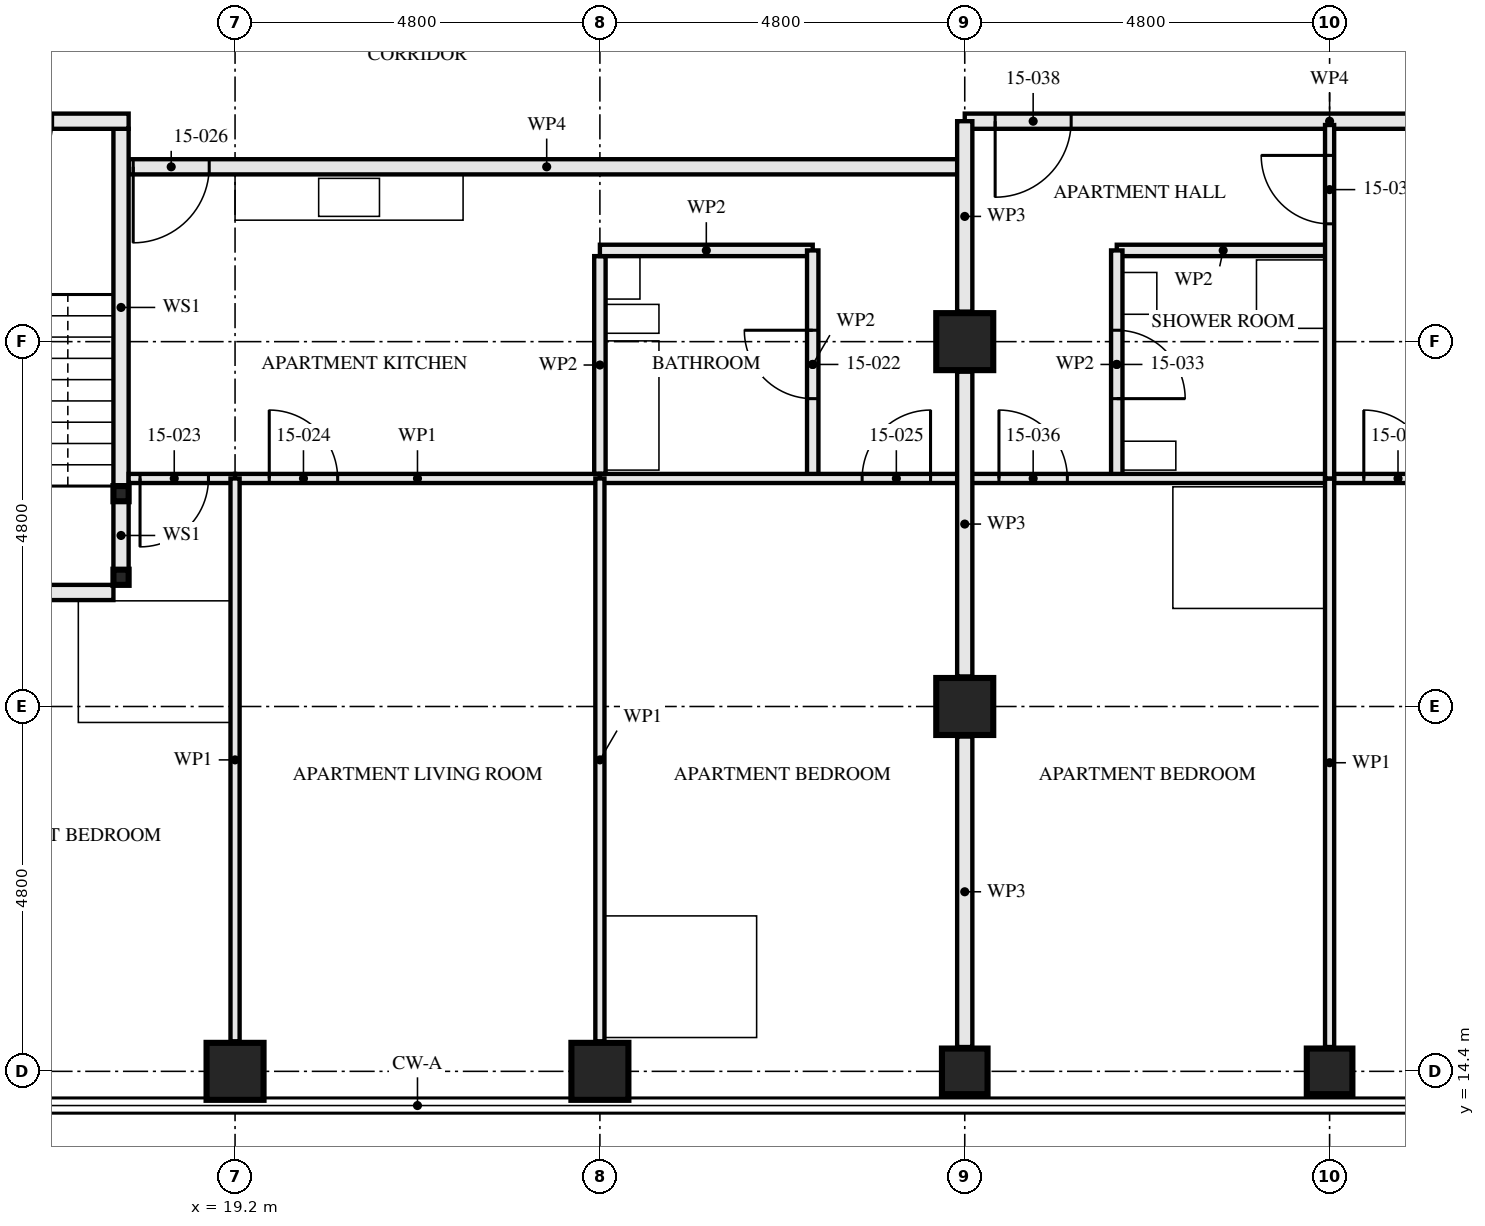
"""IFC4 building model, lengths in metres.
Left out: names, types, materials, properties, quantities, classifications, styles, units other than length and angle.
Written with IfcOpenShell. Run it as: python <this file> out.ifc"""

import sys

from ifc_helpers import new_model, si_unit, direction, frame, frame_2d, origin, origin_2d, place, context, subcontext, project, spatial, rectangle, hollow_rectangle, extrude, element, fill, save


model = new_model("IFC4")
c1 = context("Model", 3, precision=1e-05, world=origin(), true_north=direction((0.0, 1.0)))
c2 = subcontext(c1, "Body", "Model", "MODEL_VIEW")
j1 = project(units=[si_unit("LENGTHUNIT", "METRE"), si_unit("PLANEANGLEUNIT", "RADIAN")], contexts=[c1])
p1 = place(None, origin())
s1 = spatial("IfcSite", under=j1, at=p1, CompositionType="ELEMENT")
p2 = place(p1, origin())
s2 = spatial("IfcBuilding", under=s1, at=p2, CompositionType="ELEMENT")
p3 = place(p2, frame((0.0, 0.0, 58.5)))
s3 = spatial("IfcBuildingStorey", under=s2, at=p3, CompositionType="ELEMENT", Elevation=58.5)
for number, where, z_axis, x_axis in (
    (1, (19.2, 14.4, 0.0), (0.0, 0.0, 1.0), (0.0, 1.0, 0.0)),
    (2, (24.0, 14.4, 0.0), (0.0, 0.0, 1.0), (0.0, 1.0, 0.0)),
):
    element("IfcColumn", number, at=place(p3, frame(where, z_axis=z_axis, x_axis=x_axis)), inside=s3, PredefinedType="COLUMN", context=c2, shape_type="SweptSolid", body=[
        extrude(hollow_rectangle(XDim=0.75, YDim=0.75, WallThickness=0.08, at=origin_2d()), origin(), (0.0, 0.0, 1.0), 3.5),
    ])
p4 = place(p3, frame((28.8, 14.4, 0.0), z_axis=(0.0, 0.0, 1.0), x_axis=(0.0, 1.0, 0.0)))
e3 = element("IfcColumn", 3, at=p4, inside=s3, PredefinedType="COLUMN", context=c2, shape_type="SweptSolid", body=[
    extrude(hollow_rectangle(XDim=0.6, YDim=0.6, WallThickness=0.08, at=origin_2d()), origin(), (0.0, 0.0, 1.0), 3.5),
])
for number, where, z_axis, x_axis in (
    (4, (28.8, 19.2, 0.0), (0.0, 0.0, 1.0), (1.0, 0.0, 0.0)),
    (5, (28.8, 24.0, 0.0), (0.0, 0.0, 1.0), (1.0, 0.0, 0.0)),
):
    element("IfcColumn", number, at=place(p3, frame(where, z_axis=z_axis, x_axis=x_axis)), inside=s3, PredefinedType="COLUMN", context=c2, shape_type="SweptSolid", body=[
        extrude(hollow_rectangle(XDim=0.75, YDim=0.75, WallThickness=0.08, at=origin_2d()), origin(), (0.0, 0.0, 1.0), 3.5),
    ])
p5 = place(p3, frame((33.6, 14.4, 0.0), z_axis=(0.0, 0.0, 1.0), x_axis=(0.0, 1.0, 0.0)))
e6 = element("IfcColumn", 6, at=p5, inside=s3, PredefinedType="COLUMN", context=c2, shape_type="SweptSolid", body=[
    extrude(hollow_rectangle(XDim=0.6, YDim=0.6, WallThickness=0.08, at=origin_2d()), origin(), (0.0, 0.0, 1.0), 3.5),
])
for number, where, z_axis, x_axis in (
    (7, (17.7, 20.9, 0.0), (0.0, 0.0, 1.0), (1.0, 0.0, 0.0)),
    (8, (17.7, 22.0, 0.0), (0.0, 0.0, 1.0), (1.0, 0.0, 0.0)),
):
    element("IfcColumn", number, at=place(p3, frame(where, z_axis=z_axis, x_axis=x_axis)), inside=s3, PredefinedType="COLUMN", context=c2, shape_type="SweptSolid", body=[
        extrude(hollow_rectangle(XDim=0.2, YDim=0.2, WallThickness=0.008, at=origin_2d()), origin(), (0.0, 0.0, 1.0), 3.33),
    ])
p6 = place(p3, frame((17.7, 21.0, 0.0), z_axis=(0.0, 0.0, 1.0), x_axis=(0.0, 1.0, 0.0)))
e9 = element("IfcWall", 9, at=p6, inside=s3, PredefinedType="SOLIDWALL", context=c2, shape_type="SweptSolid", body=[
    extrude(rectangle(XDim=0.9, YDim=0.2, at=frame_2d((0.45, 0.0))), origin(), (0.0, 0.0, 1.0), 2.99),
])
p7 = place(p3, frame((17.7, 22.1, 0.0), z_axis=(0.0, 0.0, 1.0), x_axis=(0.0, 1.0, 0.0)))
e10 = element("IfcWall", 10, at=p7, inside=s3, PredefinedType="SOLIDWALL", context=c2, shape_type="SweptSolid", body=[
    extrude(rectangle(XDim=4.7, YDim=0.2, at=frame_2d((2.35, 0.0))), origin(), (0.0, 0.0, 1.0), 2.99),
])
p8 = place(p3, frame((15.0, 20.7, 0.0), z_axis=(0.0, 0.0, 1.0), x_axis=(1.0, 0.0, 0.0)))
e11 = element("IfcWall", 11, at=p8, inside=s3, PredefinedType="SOLIDWALL", context=c2, shape_type="SweptSolid", body=[
    extrude(rectangle(XDim=2.6, YDim=0.2, at=frame_2d((1.3, 0.0))), origin(), (0.0, 0.0, 1.0), 3.33),
])
p9 = place(p3, frame((14.4, 26.9, 0.0), z_axis=(0.0, 0.0, 1.0), x_axis=(1.0, 0.0, 0.0)))
e12 = element("IfcWall", 12, at=p9, inside=s3, PredefinedType="SOLIDWALL", context=c2, shape_type="SweptSolid", body=[
    extrude(rectangle(XDim=3.4, YDim=0.2, at=frame_2d((1.7, 0.0))), origin(), (0.0, 0.0, 1.0), 3.33),
])
p10 = place(p9, frame((1.4, 0.0, 0.0)))
e13 = element("IfcOpeningElement", 13, at=p10, cuts=e12, PredefinedType="OPENING", context=c2, shape_type="SweptSolid", body=[
    extrude(rectangle(XDim=1.0, YDim=2.1, at=frame_2d((0.5, 1.05))), frame((0.0, 0.111, 0.0), z_axis=(0.0, -1.0, 0.0), x_axis=(1.0, 0.0, 0.0)), (0.0, 0.0, 1.0), 0.221),
])
p11 = place(p3, frame((26.8, 22.2, 0.0), z_axis=(0.0, 0.0, 1.0), x_axis=(0.0, 1.0, 0.0)))
e14 = element("IfcWall", 14, at=p11, inside=s3, PredefinedType="PARTITIONING", context=c2, shape_type="SweptSolid", body=[
    extrude(rectangle(XDim=3.0, YDim=0.15, at=frame_2d((1.5, 0.0))), origin(), (0.0, 0.0, 1.0), 2.55),
])
p12 = place(p11, frame((1.05, 0.0, 0.0)))
e15 = element("IfcOpeningElement", 15, at=p12, cuts=e14, PredefinedType="OPENING", context=c2, shape_type="SweptSolid", body=[
    extrude(rectangle(XDim=0.9, YDim=2.1, at=frame_2d((0.45, 1.05))), frame((0.0, 0.085, 0.0), z_axis=(0.0, -1.0, 0.0), x_axis=(1.0, 0.0, 0.0)), (0.0, 0.0, 1.0), 0.171),
])
p13 = place(p3, frame((24.0, 25.2, 0.0), z_axis=(0.0, 0.0, 1.0), x_axis=(1.0, 0.0, 0.0)))
e16 = element("IfcWall", 16, at=p13, inside=s3, PredefinedType="PARTITIONING", context=c2, shape_type="SweptSolid", body=[
    extrude(rectangle(XDim=2.8, YDim=0.15, at=frame_2d((1.4, 0.0))), origin(), (0.0, 0.0, 1.0), 3.33),
])
p14 = place(p3, frame((17.8, 22.2, 0.0), z_axis=(0.0, 0.0, 1.0), x_axis=(1.0, 0.0, 0.0)))
e17 = element("IfcWall", 17, at=p14, inside=s3, PredefinedType="PARTITIONING", context=c2, shape_type="SweptSolid", body=[
    extrude(rectangle(XDim=1.4, YDim=0.12, at=frame_2d((0.7, 0.0))), origin(), (0.0, 0.0, 1.0), 3.33),
])
p15 = place(p14, frame((0.15, 0.0, 0.0)))
e18 = element("IfcOpeningElement", 18, at=p15, cuts=e17, PredefinedType="OPENING", context=c2, shape_type="SweptSolid", body=[
    extrude(rectangle(XDim=0.9, YDim=2.1, at=frame_2d((0.45, 1.05))), frame((0.0, 0.071, 0.0), z_axis=(0.0, -1.0, 0.0), x_axis=(1.0, 0.0, 0.0)), (0.0, 0.0, 1.0), 0.141),
])
p16 = place(p3, frame((19.2, 22.2, 0.0), z_axis=(0.0, 0.0, 1.0), x_axis=(1.0, 0.0, 0.0)))
e19 = element("IfcWall", 19, at=p16, inside=s3, PredefinedType="PARTITIONING", context=c2, shape_type="SweptSolid", body=[
    extrude(rectangle(XDim=4.8, YDim=0.12, at=frame_2d((2.4, 0.0))), origin(), (0.0, 0.0, 1.0), 3.33),
])
p17 = place(p16, frame((0.45, 0.0, 0.0)))
e20 = element("IfcOpeningElement", 20, at=p17, cuts=e19, PredefinedType="OPENING", context=c2, shape_type="SweptSolid", body=[
    extrude(rectangle(XDim=0.9, YDim=2.1, at=frame_2d((0.45, 1.05))), frame((0.0, 0.071, 0.0), z_axis=(0.0, -1.0, 0.0), x_axis=(1.0, 0.0, 0.0)), (0.0, 0.0, 1.0), 0.141),
])
p18 = place(p3, frame((24.0, 22.2, 0.0), z_axis=(0.0, 0.0, 1.0), x_axis=(1.0, 0.0, 0.0)))
e21 = element("IfcWall", 21, at=p18, inside=s3, PredefinedType="PARTITIONING", context=c2, shape_type="SweptSolid", body=[
    extrude(rectangle(XDim=4.8, YDim=0.12, at=frame_2d((2.4, 0.0))), origin(), (0.0, 0.0, 1.0), 3.33),
])
p19 = place(p18, frame((3.45, 0.0, 0.0)))
e22 = element("IfcOpeningElement", 22, at=p19, cuts=e21, PredefinedType="OPENING", context=c2, shape_type="SweptSolid", body=[
    extrude(rectangle(XDim=0.9, YDim=2.1, at=frame_2d((0.45, 1.05))), frame((0.0, 0.071, 0.0), z_axis=(0.0, -1.0, 0.0), x_axis=(1.0, 0.0, 0.0)), (0.0, 0.0, 1.0), 0.141),
])
for number, where, z_axis, x_axis in (
    (23, (19.2, 14.795, 0.0), (0.0, 0.0, 1.0), (0.0, 1.0, 0.0)),
    (24, (24.0, 14.795, 0.0), (0.0, 0.0, 1.0), (0.0, 1.0, 0.0)),
):
    element("IfcWall", number, at=place(p3, frame(where, z_axis=z_axis, x_axis=x_axis)), inside=s3, PredefinedType="PARTITIONING", context=c2, shape_type="SweptSolid", body=[
        extrude(rectangle(XDim=7.405, YDim=0.12, at=frame_2d((3.703, 0.0))), origin(), (0.0, 0.0, 1.0), 2.55),
    ])
p20 = place(p3, frame((17.8, 26.3, 0.0), z_axis=(0.0, 0.0, 1.0), x_axis=(1.0, 0.0, 0.0)))
e25 = element("IfcWall", 25, at=p20, inside=s3, PredefinedType="PARTITIONING", context=c2, shape_type="SweptSolid", body=[
    extrude(rectangle(XDim=11.0, YDim=0.2, at=frame_2d((5.5, 0.0))), origin(), (0.0, 0.0, 1.0), 2.55),
])
p21 = place(p20, frame((0.06, 0.0, 0.0)))
e26 = element("IfcOpeningElement", 26, at=p21, cuts=e25, PredefinedType="OPENING", context=c2, shape_type="SweptSolid", body=[
    extrude(rectangle(XDim=1.0, YDim=2.1, at=frame_2d((0.5, 1.05))), frame((0.0, 0.111, 0.0), z_axis=(0.0, -1.0, 0.0), x_axis=(1.0, 0.0, 0.0)), (0.0, 0.0, 1.0), 0.221),
])
p22 = place(p3, frame((30.8, 22.2, 0.0), z_axis=(0.0, 0.0, 1.0), x_axis=(0.0, 1.0, 0.0)))
e27 = element("IfcWall", 27, at=p22, inside=s3, PredefinedType="PARTITIONING", context=c2, shape_type="SweptSolid", body=[
    extrude(rectangle(XDim=3.0, YDim=0.15, at=frame_2d((1.5, 0.0))), origin(), (0.0, 0.0, 1.0), 2.55),
])
p23 = place(p22, frame((1.05, 0.0, 0.0)))
e28 = element("IfcOpeningElement", 28, at=p23, cuts=e27, PredefinedType="OPENING", context=c2, shape_type="SweptSolid", body=[
    extrude(rectangle(XDim=0.9, YDim=2.1, at=frame_2d((0.45, 1.05))), frame((0.0, 0.085, 0.0), z_axis=(0.0, -1.0, 0.0), x_axis=(1.0, 0.0, 0.0)), (0.0, 0.0, 1.0), 0.171),
])
p24 = place(p3, frame((30.8, 25.2, 0.0), z_axis=(0.0, 0.0, 1.0), x_axis=(1.0, 0.0, 0.0)))
e29 = element("IfcWall", 29, at=p24, inside=s3, PredefinedType="PARTITIONING", context=c2, shape_type="SweptSolid", body=[
    extrude(rectangle(XDim=2.8, YDim=0.15, at=frame_2d((1.4, 0.0))), origin(), (0.0, 0.0, 1.0), 3.33),
])
p25 = place(p3, frame((33.6, 22.2, 0.0), z_axis=(0.0, 0.0, 1.0), x_axis=(0.0, 1.0, 0.0)))
e30 = element("IfcWall", 30, at=p25, inside=s3, PredefinedType="PARTITIONING", context=c2, shape_type="SweptSolid", body=[
    extrude(rectangle(XDim=4.65, YDim=0.12, at=frame_2d((2.325, 0.0))), origin(), (0.0, 0.0, 1.0), 2.55),
])
p26 = place(p25, frame((3.35, 0.0, 0.0)))
e31 = element("IfcOpeningElement", 31, at=p26, cuts=e30, PredefinedType="OPENING", context=c2, shape_type="SweptSolid", body=[
    extrude(rectangle(XDim=0.9, YDim=2.1, at=frame_2d((0.45, 1.05))), frame((0.0, 0.071, 0.0), z_axis=(0.0, -1.0, 0.0), x_axis=(1.0, 0.0, 0.0)), (0.0, 0.0, 1.0), 0.141),
])
p27 = place(p3, frame((28.8, 22.2, 0.0), z_axis=(0.0, 0.0, 1.0), x_axis=(1.0, 0.0, 0.0)))
e32 = element("IfcWall", 32, at=p27, inside=s3, PredefinedType="PARTITIONING", context=c2, shape_type="SweptSolid", body=[
    extrude(rectangle(XDim=4.8, YDim=0.12, at=frame_2d((2.4, 0.0))), origin(), (0.0, 0.0, 1.0), 3.33),
])
p28 = place(p27, frame((0.45, 0.0, 0.0)))
e33 = element("IfcOpeningElement", 33, at=p28, cuts=e32, PredefinedType="OPENING", context=c2, shape_type="SweptSolid", body=[
    extrude(rectangle(XDim=0.9, YDim=2.1, at=frame_2d((0.45, 1.05))), frame((0.0, 0.071, 0.0), z_axis=(0.0, -1.0, 0.0), x_axis=(1.0, 0.0, 0.0)), (0.0, 0.0, 1.0), 0.141),
])
p29 = place(p3, frame((33.6, 22.2, 0.0), z_axis=(0.0, 0.0, 1.0), x_axis=(1.0, 0.0, 0.0)))
e34 = element("IfcWall", 34, at=p29, inside=s3, PredefinedType="PARTITIONING", context=c2, shape_type="SweptSolid", body=[
    extrude(rectangle(XDim=4.8, YDim=0.12, at=frame_2d((2.4, 0.0))), origin(), (0.0, 0.0, 1.0), 3.33),
])
p30 = place(p29, frame((0.45, 0.0, 0.0)))
e35 = element("IfcOpeningElement", 35, at=p30, cuts=e34, PredefinedType="OPENING", context=c2, shape_type="SweptSolid", body=[
    extrude(rectangle(XDim=0.9, YDim=2.1, at=frame_2d((0.45, 1.05))), frame((0.0, 0.071, 0.0), z_axis=(0.0, -1.0, 0.0), x_axis=(1.0, 0.0, 0.0)), (0.0, 0.0, 1.0), 0.141),
])
p31 = place(p3, frame((33.6, 14.72, 0.0), z_axis=(0.0, 0.0, 1.0), x_axis=(0.0, 1.0, 0.0)))
e36 = element("IfcWall", 36, at=p31, inside=s3, PredefinedType="PARTITIONING", context=c2, shape_type="SweptSolid", body=[
    extrude(rectangle(XDim=7.48, YDim=0.12, at=frame_2d((3.74, 0.0))), origin(), (0.0, 0.0, 1.0), 2.55),
])
p32 = place(p3, frame((28.8, 26.9, 0.0), z_axis=(0.0, 0.0, 1.0), x_axis=(1.0, 0.0, 0.0)))
e37 = element("IfcWall", 37, at=p32, inside=s3, PredefinedType="PARTITIONING", context=c2, shape_type="SweptSolid", body=[
    extrude(rectangle(XDim=9.6, YDim=0.2, at=frame_2d((4.8, 0.0))), origin(), (0.0, 0.0, 1.0), 3.33),
])
p33 = place(p32, frame((0.4, 0.0, 0.0)))
e38 = element("IfcOpeningElement", 38, at=p33, cuts=e37, PredefinedType="OPENING", context=c2, shape_type="SweptSolid", body=[
    extrude(rectangle(XDim=1.0, YDim=2.1, at=frame_2d((0.5, 1.05))), frame((0.0, 0.111, 0.0), z_axis=(0.0, -1.0, 0.0), x_axis=(1.0, 0.0, 0.0)), (0.0, 0.0, 1.0), 0.221),
])
p34 = place(p3, frame((28.8, 14.72, 0.0), z_axis=(0.0, 0.0, 1.0), x_axis=(0.0, 1.0, 0.0)))
e39 = element("IfcWall", 39, at=p34, inside=s3, PredefinedType="PARTITIONING", context=c2, shape_type="SweptSolid", body=[
    extrude(rectangle(XDim=4.085, YDim=0.2, at=frame_2d((2.042, 0.0))), origin(), (0.0, 0.0, 1.0), 2.32),
])
p35 = place(p3, frame((28.8, 19.595, 0.0), z_axis=(0.0, 0.0, 1.0), x_axis=(0.0, 1.0, 0.0)))
e40 = element("IfcWall", 40, at=p35, inside=s3, PredefinedType="PARTITIONING", context=c2, shape_type="SweptSolid", body=[
    extrude(rectangle(XDim=4.01, YDim=0.2, at=frame_2d((2.005, 0.0))), origin(), (0.0, 0.0, 1.0), 2.32),
])
p36 = place(p3, frame((28.8, 24.395, 0.0), z_axis=(0.0, 0.0, 1.0), x_axis=(0.0, 1.0, 0.0)))
e41 = element("IfcWall", 41, at=p36, inside=s3, PredefinedType="PARTITIONING", context=c2, shape_type="SweptSolid", body=[
    extrude(rectangle(XDim=2.505, YDim=0.2, at=frame_2d((1.252, 0.0))), origin(), (0.0, 0.0, 1.0), 2.32),
])
p37 = place(p3, frame((24.0, 22.26, 0.0), z_axis=(0.0, 0.0, 1.0), x_axis=(0.0, 1.0, 0.0)))
e42 = element("IfcWall", 42, at=p37, inside=s3, PredefinedType="PARTITIONING", context=c2, shape_type="SweptSolid", body=[
    extrude(rectangle(XDim=2.865, YDim=0.15, at=frame_2d((1.433, 0.0))), origin(), (0.0, 0.0, 1.0), 2.55),
])
p38 = place(p12, origin())
e43 = element("IfcDoor", 43, at=p38, inside=s3, OperationType="SINGLE_SWING_LEFT", PredefinedType="DOOR", context=c2, shape_type="SweptSolid", body=[
    extrude(rectangle(XDim=0.9, YDim=2.1, at=frame_2d((0.45, 1.05))), frame((0.0, 0.022, 0.0), z_axis=(0.0, -1.0, 0.0), x_axis=(1.0, 0.0, 0.0)), (0.0, 0.0, 1.0), 0.044),
])
fill(e15, e43)
p39 = place(p15, frame((0.9, 0.0, 0.0), z_axis=(0.0, 0.0, 1.0), x_axis=(-1.0, 0.0, 0.0)))
e44 = element("IfcDoor", 44, at=p39, inside=s3, OperationType="SINGLE_SWING_LEFT", PredefinedType="DOOR", context=c2, shape_type="SweptSolid", body=[
    extrude(rectangle(XDim=0.9, YDim=2.1, at=frame_2d((0.45, 1.05))), frame((0.0, 0.022, 0.0), z_axis=(0.0, -1.0, 0.0), x_axis=(1.0, 0.0, 0.0)), (0.0, 0.0, 1.0), 0.044),
])
fill(e18, e44)
p40 = place(p17, origin())
e45 = element("IfcDoor", 45, at=p40, inside=s3, OperationType="SINGLE_SWING_RIGHT", PredefinedType="DOOR", context=c2, shape_type="SweptSolid", body=[
    extrude(rectangle(XDim=0.9, YDim=2.1, at=frame_2d((0.45, 1.05))), frame((0.0, 0.022, 0.0), z_axis=(0.0, -1.0, 0.0), x_axis=(1.0, 0.0, 0.0)), (0.0, 0.0, 1.0), 0.044),
])
fill(e20, e45)
p41 = place(p19, origin())
e46 = element("IfcDoor", 46, at=p41, inside=s3, OperationType="SINGLE_SWING_LEFT", PredefinedType="DOOR", context=c2, shape_type="SweptSolid", body=[
    extrude(rectangle(XDim=0.9, YDim=2.1, at=frame_2d((0.45, 1.05))), frame((0.0, 0.022, 0.0), z_axis=(0.0, -1.0, 0.0), x_axis=(1.0, 0.0, 0.0)), (0.0, 0.0, 1.0), 0.044),
])
fill(e22, e46)
p42 = place(p21, frame((1.0, 0.0, 0.0), z_axis=(0.0, 0.0, 1.0), x_axis=(-1.0, 0.0, 0.0)))
e47 = element("IfcDoor", 47, at=p42, inside=s3, OperationType="SINGLE_SWING_LEFT", PredefinedType="DOOR", context=c2, shape_type="SweptSolid", body=[
    extrude(rectangle(XDim=1.0, YDim=2.1, at=frame_2d((0.5, 1.05))), frame((0.0, 0.027, 0.0), z_axis=(0.0, -1.0, 0.0), x_axis=(1.0, 0.0, 0.0)), (0.0, 0.0, 1.0), 0.054),
])
fill(e26, e47)
p43 = place(p23, frame((0.9, 0.0, 0.0), z_axis=(0.0, 0.0, 1.0), x_axis=(-1.0, 0.0, 0.0)))
e48 = element("IfcDoor", 48, at=p43, inside=s3, OperationType="SINGLE_SWING_LEFT", PredefinedType="DOOR", context=c2, shape_type="SweptSolid", body=[
    extrude(rectangle(XDim=0.9, YDim=2.1, at=frame_2d((0.45, 1.05))), frame((0.0, 0.022, 0.0), z_axis=(0.0, -1.0, 0.0), x_axis=(1.0, 0.0, 0.0)), (0.0, 0.0, 1.0), 0.044),
])
fill(e28, e48)
p44 = place(p26, origin())
e49 = element("IfcDoor", 49, at=p44, inside=s3, OperationType="SINGLE_SWING_LEFT", PredefinedType="DOOR", context=c2, shape_type="SweptSolid", body=[
    extrude(rectangle(XDim=0.9, YDim=2.1, at=frame_2d((0.45, 1.05))), frame((0.0, 0.022, 0.0), z_axis=(0.0, -1.0, 0.0), x_axis=(1.0, 0.0, 0.0)), (0.0, 0.0, 1.0), 0.044),
])
fill(e31, e49)
p45 = place(p28, origin())
e50 = element("IfcDoor", 50, at=p45, inside=s3, OperationType="SINGLE_SWING_RIGHT", PredefinedType="DOOR", context=c2, shape_type="SweptSolid", body=[
    extrude(rectangle(XDim=0.9, YDim=2.1, at=frame_2d((0.45, 1.05))), frame((0.0, 0.022, 0.0), z_axis=(0.0, -1.0, 0.0), x_axis=(1.0, 0.0, 0.0)), (0.0, 0.0, 1.0), 0.044),
])
fill(e33, e50)
p46 = place(p30, origin())
e51 = element("IfcDoor", 51, at=p46, inside=s3, OperationType="SINGLE_SWING_RIGHT", PredefinedType="DOOR", context=c2, shape_type="SweptSolid", body=[
    extrude(rectangle(XDim=0.9, YDim=2.1, at=frame_2d((0.45, 1.05))), frame((0.0, 0.022, 0.0), z_axis=(0.0, -1.0, 0.0), x_axis=(1.0, 0.0, 0.0)), (0.0, 0.0, 1.0), 0.044),
])
fill(e35, e51)
p47 = place(p33, frame((1.0, 0.0, 0.0), z_axis=(0.0, 0.0, 1.0), x_axis=(-1.0, 0.0, 0.0)))
e52 = element("IfcDoor", 52, at=p47, inside=s3, OperationType="SINGLE_SWING_LEFT", PredefinedType="DOOR", context=c2, shape_type="SweptSolid", body=[
    extrude(rectangle(XDim=1.0, YDim=2.1, at=frame_2d((0.5, 1.05))), frame((0.0, 0.027, 0.0), z_axis=(0.0, -1.0, 0.0), x_axis=(1.0, 0.0, 0.0)), (0.0, 0.0, 1.0), 0.054),
])
fill(e38, e52)
save(model, sys.argv[1])
